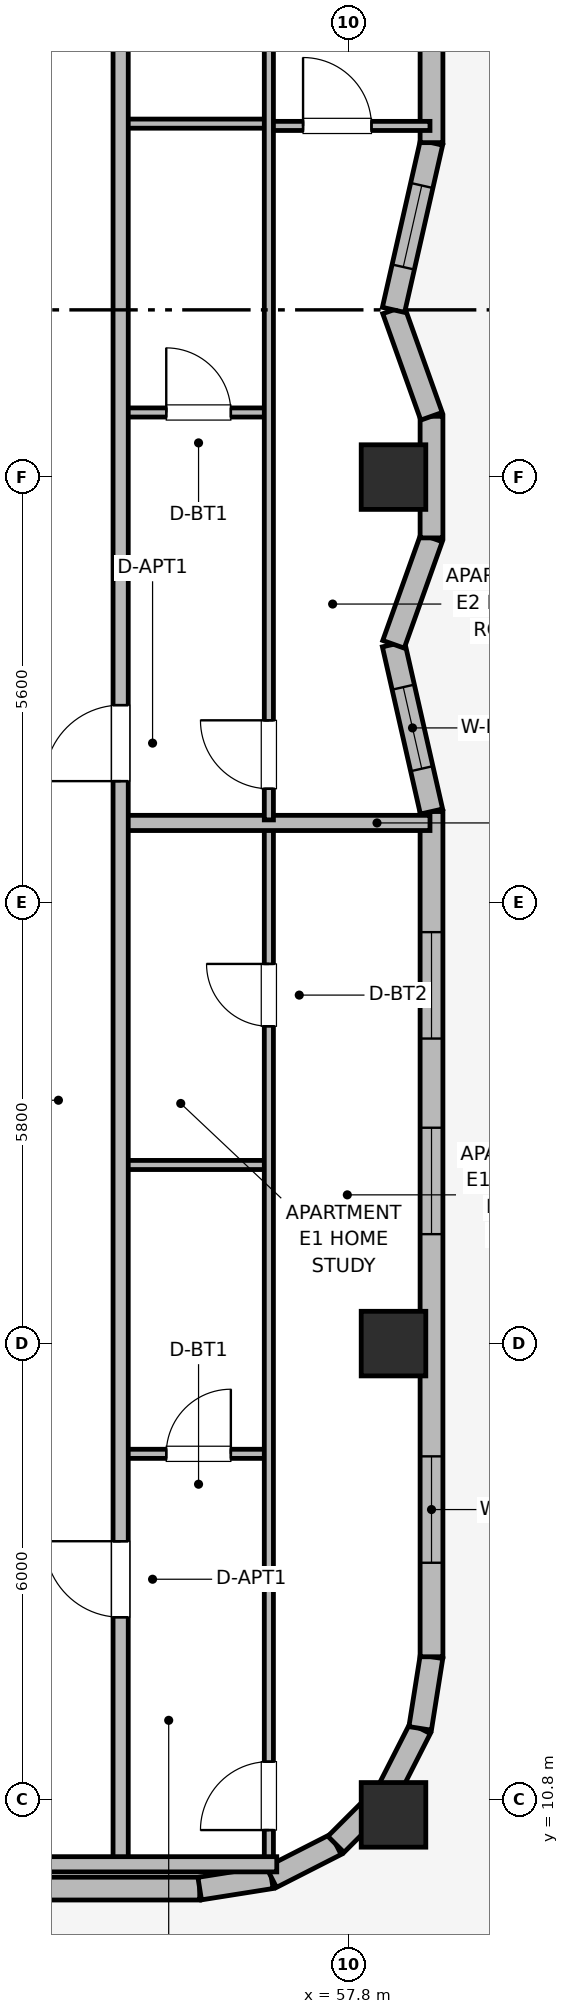
"""IFC4 building model, lengths in metres.
Left out: names, types, materials, properties, quantities, classifications, styles, units other than length and angle.
Written with IfcOpenShell. Run it as: python <this file> out.ifc"""

import sys

from ifc_helpers import new_model, si_unit, direction, frame, frame_2d, origin, origin_2d, place, context, subcontext, project, spatial, rectangle, extrude, element, fill, save


model = new_model("IFC4")
c1 = context("Model", 3, precision=1e-05, world=origin(), true_north=direction((0.0, 1.0)))
c2 = subcontext(c1, "Body", "Model", "MODEL_VIEW")
j1 = project(units=[si_unit("LENGTHUNIT", "METRE"), si_unit("PLANEANGLEUNIT", "RADIAN")], contexts=[c1])
p1 = place(None, origin())
s1 = spatial("IfcSite", under=j1, at=p1, CompositionType="ELEMENT")
p2 = place(p1, origin())
s2 = spatial("IfcBuilding", under=s1, at=p2, CompositionType="ELEMENT")
p3 = place(p2, frame((0.0, 0.0, 225.8)))
s3 = spatial("IfcBuildingStorey", under=s2, at=p3, CompositionType="ELEMENT", Elevation=225.8)
for number, where, z_axis, x_axis in (
    (1, (58.39, 10.6, 0.0), (0.0, 0.0, 1.0), (1.0, 0.0, 0.0)),
    (2, (58.39, 16.8, 0.0), (0.0, 0.0, 1.0), (1.0, 0.0, 0.0)),
    (3, (58.39, 28.2, 0.0), (0.0, 0.0, 1.0), (1.0, 0.0, 0.0)),
):
    element("IfcColumn", number, at=place(p3, frame(where, z_axis=z_axis, x_axis=x_axis)), inside=s3, PredefinedType="COLUMN", context=c2, shape_type="SweptSolid", body=[
        extrude(rectangle(XDim=0.85, YDim=0.85, at=origin_2d()), origin(), (0.0, 0.0, 1.0), 3.7),
    ])
p4 = place(p3, frame((22.56, 9.63, 0.0), z_axis=(0.0, 0.0, 1.0), x_axis=(1.0, 0.0, 0.0)))
e4 = element("IfcWall", 4, at=p4, inside=s3, PredefinedType="SOLIDWALL", context=c2, shape_type="SweptSolid", body=[
    extrude(rectangle(XDim=33.28, YDim=0.3, at=frame_2d((16.64, 0.0))), origin(), (0.0, 0.0, 1.0), 2.73),
])
p5 = place(p4, frame((4.647, 0.0, 0.71)))
e5 = element("IfcOpeningElement", 5, at=p5, cuts=e4, PredefinedType="OPENING", context=c2, shape_type="SweptSolid", body=[
    extrude(rectangle(XDim=1.6, YDim=1.9, at=frame_2d((0.8, 0.95))), frame((0.0, 0.16, 0.0), z_axis=(0.0, -1.0, 0.0), x_axis=(1.0, 0.0, 0.0)), (0.0, 0.0, 1.0), 0.32),
])
p6 = place(p4, frame((7.845, 0.0, 0.71)))
e6 = element("IfcOpeningElement", 6, at=p6, cuts=e4, PredefinedType="OPENING", context=c2, shape_type="SweptSolid", body=[
    extrude(rectangle(XDim=1.6, YDim=1.9, at=frame_2d((0.8, 0.95))), frame((0.0, 0.16, 0.0), z_axis=(0.0, -1.0, 0.0), x_axis=(1.0, 0.0, 0.0)), (0.0, 0.0, 1.0), 0.32),
])
p7 = place(p4, frame((14.241, 0.0, 0.71)))
e7 = element("IfcOpeningElement", 7, at=p7, cuts=e4, PredefinedType="OPENING", context=c2, shape_type="SweptSolid", body=[
    extrude(rectangle(XDim=1.6, YDim=1.9, at=frame_2d((0.8, 0.95))), frame((0.0, 0.16, 0.0), z_axis=(0.0, -1.0, 0.0), x_axis=(1.0, 0.0, 0.0)), (0.0, 0.0, 1.0), 0.32),
])
p8 = place(p4, frame((17.439, 0.0, 0.71)))
e8 = element("IfcOpeningElement", 8, at=p8, cuts=e4, PredefinedType="OPENING", context=c2, shape_type="SweptSolid", body=[
    extrude(rectangle(XDim=1.6, YDim=1.9, at=frame_2d((0.8, 0.95))), frame((0.0, 0.16, 0.0), z_axis=(0.0, -1.0, 0.0), x_axis=(1.0, 0.0, 0.0)), (0.0, 0.0, 1.0), 0.32),
])
p9 = place(p4, frame((23.835, 0.0, 0.71)))
e9 = element("IfcOpeningElement", 9, at=p9, cuts=e4, PredefinedType="OPENING", context=c2, shape_type="SweptSolid", body=[
    extrude(rectangle(XDim=1.6, YDim=1.9, at=frame_2d((0.8, 0.95))), frame((0.0, 0.16, 0.0), z_axis=(0.0, -1.0, 0.0), x_axis=(1.0, 0.0, 0.0)), (0.0, 0.0, 1.0), 0.32),
])
p10 = place(p4, frame((27.033, 0.0, 0.71)))
e10 = element("IfcOpeningElement", 10, at=p10, cuts=e4, PredefinedType="OPENING", context=c2, shape_type="SweptSolid", body=[
    extrude(rectangle(XDim=1.6, YDim=1.9, at=frame_2d((0.8, 0.95))), frame((0.0, 0.16, 0.0), z_axis=(0.0, -1.0, 0.0), x_axis=(1.0, 0.0, 0.0)), (0.0, 0.0, 1.0), 0.32),
])
p11 = place(p3, frame((55.84, 9.63, 0.0), z_axis=(0.0, 0.0, 1.0), x_axis=(0.987663181641, 0.156593229835, 0.0)))
e11 = element("IfcWall", 11, at=p11, inside=s3, PredefinedType="SOLIDWALL", context=c2, shape_type="SweptSolid", body=[
    extrude(rectangle(XDim=0.954, YDim=0.3, at=frame_2d((0.477, 0.0))), origin(), (0.0, 0.0, 1.0), 2.73),
])
for number, where, z_axis, x_axis in (
    (12, (56.782, 9.779, 0.0), (0.0, 0.0, 1.0), (0.891, 0.454, 0.0)),
    (13, (57.633, 10.212, 0.0), (0.0, 0.0, 1.0), (0.707, 0.707, 0.0)),
    (14, (58.308, 10.887, 0.0), (0.0, 0.0, 1.0), (0.454, 0.891, 0.0)),
):
    element("IfcWall", number, at=place(p3, frame(where, z_axis=z_axis, x_axis=x_axis)), inside=s3, PredefinedType="SOLIDWALL", context=c2, shape_type="SweptSolid", body=[
        extrude(rectangle(XDim=0.954, YDim=0.3, at=frame_2d((0.477, 0.0))), origin(), (0.0, 0.0, 1.0), 2.73),
    ])
p12 = place(p3, frame((58.741, 11.738, 0.0), z_axis=(0.0, 0.0, 1.0), x_axis=(0.156343617883, 0.987702725088, 0.0)))
e15 = element("IfcWall", 15, at=p12, inside=s3, PredefinedType="SOLIDWALL", context=c2, shape_type="SweptSolid", body=[
    extrude(rectangle(XDim=0.954, YDim=0.3, at=frame_2d((0.477, 0.0))), origin(), (0.0, 0.0, 1.0), 2.73),
])
p13 = place(p3, frame((58.89, 12.68, 0.0), z_axis=(0.0, 0.0, 1.0), x_axis=(0.0, 1.0, 0.0)))
e16 = element("IfcWall", 16, at=p13, inside=s3, PredefinedType="SOLIDWALL", context=c2, shape_type="SweptSolid", body=[
    extrude(rectangle(XDim=11.12, YDim=0.3, at=frame_2d((5.56, 0.0))), origin(), (0.0, 0.0, 1.0), 2.73),
])
p14 = place(p13, frame((1.237, 0.0, 0.76)))
e17 = element("IfcOpeningElement", 17, at=p14, cuts=e16, PredefinedType="OPENING", context=c2, shape_type="SweptSolid", body=[
    extrude(rectangle(XDim=1.4, YDim=1.85, at=frame_2d((0.7, 0.925))), frame((0.0, 0.16, 0.0), z_axis=(0.0, -1.0, 0.0), x_axis=(1.0, 0.0, 0.0)), (0.0, 0.0, 1.0), 0.32),
])
p15 = place(p13, frame((5.56, 0.0, 0.76)))
e18 = element("IfcOpeningElement", 18, at=p15, cuts=e16, PredefinedType="OPENING", context=c2, shape_type="SweptSolid", body=[
    extrude(rectangle(XDim=1.4, YDim=1.85, at=frame_2d((0.7, 0.925))), frame((0.0, 0.16, 0.0), z_axis=(0.0, -1.0, 0.0), x_axis=(1.0, 0.0, 0.0)), (0.0, 0.0, 1.0), 0.32),
])
p16 = place(p13, frame((8.133, 0.0, 0.76)))
e19 = element("IfcOpeningElement", 19, at=p16, cuts=e16, PredefinedType="OPENING", context=c2, shape_type="SweptSolid", body=[
    extrude(rectangle(XDim=1.4, YDim=1.85, at=frame_2d((0.7, 0.925))), frame((0.0, 0.16, 0.0), z_axis=(0.0, -1.0, 0.0), x_axis=(1.0, 0.0, 0.0)), (0.0, 0.0, 1.0), 0.32),
])
p17 = place(p3, frame((58.89, 23.8, 0.0), z_axis=(0.0, 0.0, 1.0), x_axis=(-0.221625780886, 0.975131792758, 0.0)))
e20 = element("IfcWall", 20, at=p17, inside=s3, PredefinedType="SOLIDWALL", context=c2, shape_type="SweptSolid", body=[
    extrude(rectangle(XDim=2.256, YDim=0.3, at=frame_2d((1.128, 0.0))), origin(), (0.0, 0.0, 1.0), 2.73),
])
p18 = place(p17, frame((0.578, 0.0, 0.92)))
e21 = element("IfcOpeningElement", 21, at=p18, cuts=e20, PredefinedType="OPENING", context=c2, shape_type="SweptSolid", body=[
    extrude(rectangle(XDim=1.1, YDim=1.65, at=frame_2d((0.55, 0.825))), frame((0.0, 0.16, 0.0), z_axis=(0.0, -1.0, 0.0), x_axis=(1.0, 0.0, 0.0)), (0.0, 0.0, 1.0), 0.32),
])
p19 = place(p3, frame((58.39, 26.0, 0.0), z_axis=(0.0, 0.0, 1.0), x_axis=(0.336357205213, 0.94173447983, 0.0)))
e22 = element("IfcWall", 22, at=p19, inside=s3, PredefinedType="SOLIDWALL", context=c2, shape_type="SweptSolid", body=[
    extrude(rectangle(XDim=1.487, YDim=0.3, at=frame_2d((0.743, 0.0))), origin(), (0.0, 0.0, 1.0), 2.73),
])
p20 = place(p3, frame((58.89, 27.4, 0.0), z_axis=(0.0, 0.0, 1.0), x_axis=(0.0, 1.0, 0.0)))
e23 = element("IfcWall", 23, at=p20, inside=s3, PredefinedType="SOLIDWALL", context=c2, shape_type="SweptSolid", body=[
    extrude(rectangle(XDim=1.6, YDim=0.3, at=frame_2d((0.8, 0.0))), origin(), (0.0, 0.0, 1.0), 2.73),
])
p21 = place(p3, frame((58.89, 29.0, 0.0), z_axis=(0.0, 0.0, 1.0), x_axis=(-0.336357205213, 0.94173447983, 0.0)))
e24 = element("IfcWall", 24, at=p21, inside=s3, PredefinedType="SOLIDWALL", context=c2, shape_type="SweptSolid", body=[
    extrude(rectangle(XDim=1.487, YDim=0.3, at=frame_2d((0.743, 0.0))), origin(), (0.0, 0.0, 1.0), 2.73),
])
p22 = place(p3, frame((58.39, 30.4, 0.0), z_axis=(0.0, 0.0, 1.0), x_axis=(0.221602396322, 0.975137107254, 0.0)))
e25 = element("IfcWall", 25, at=p22, inside=s3, PredefinedType="SOLIDWALL", context=c2, shape_type="SweptSolid", body=[
    extrude(rectangle(XDim=2.256, YDim=0.3, at=frame_2d((1.128, 0.0))), origin(), (0.0, 0.0, 1.0), 2.73),
])
p23 = place(p22, frame((0.578, 0.0, 0.92)))
e26 = element("IfcOpeningElement", 26, at=p23, cuts=e25, PredefinedType="OPENING", context=c2, shape_type="SweptSolid", body=[
    extrude(rectangle(XDim=1.1, YDim=1.65, at=frame_2d((0.55, 0.825))), frame((0.0, 0.16, 0.0), z_axis=(0.0, -1.0, 0.0), x_axis=(1.0, 0.0, 0.0)), (0.0, 0.0, 1.0), 0.32),
])
p24 = place(p3, frame((58.89, 32.6, 0.0), z_axis=(0.0, 0.0, 1.0), x_axis=(0.0, 1.0, 0.0)))
e27 = element("IfcWall", 27, at=p24, inside=s3, PredefinedType="SOLIDWALL", context=c2, shape_type="SweptSolid", body=[
    extrude(rectangle(XDim=11.12, YDim=0.3, at=frame_2d((5.56, 0.0))), origin(), (0.0, 0.0, 1.0), 2.73),
])
p25 = place(p24, frame((1.737, 0.0, 0.95)))
e28 = element("IfcOpeningElement", 28, at=p25, cuts=e27, PredefinedType="OPENING", context=c2, shape_type="SweptSolid", body=[
    extrude(rectangle(XDim=1.1, YDim=1.65, at=frame_2d((0.55, 0.825))), frame((0.0, 0.16, 0.0), z_axis=(0.0, -1.0, 0.0), x_axis=(1.0, 0.0, 0.0)), (0.0, 0.0, 1.0), 0.32),
])
p26 = place(p24, frame((4.66, 0.0, 0.95)))
e29 = element("IfcOpeningElement", 29, at=p26, cuts=e27, PredefinedType="OPENING", context=c2, shape_type="SweptSolid", body=[
    extrude(rectangle(XDim=1.1, YDim=1.65, at=frame_2d((0.55, 0.825))), frame((0.0, 0.16, 0.0), z_axis=(0.0, -1.0, 0.0), x_axis=(1.0, 0.0, 0.0)), (0.0, 0.0, 1.0), 0.32),
])
p27 = place(p24, frame((8.283, 0.0, 0.95)))
e30 = element("IfcOpeningElement", 30, at=p27, cuts=e27, PredefinedType="OPENING", context=c2, shape_type="SweptSolid", body=[
    extrude(rectangle(XDim=1.1, YDim=1.65, at=frame_2d((0.55, 0.825))), frame((0.0, 0.16, 0.0), z_axis=(0.0, -1.0, 0.0), x_axis=(1.0, 0.0, 0.0)), (0.0, 0.0, 1.0), 0.32),
])
p28 = place(p3, frame((54.8, 15.35, 0.0), z_axis=(0.0, 0.0, 1.0), x_axis=(1.0, 0.0, 0.0)))
e31 = element("IfcWall", 31, at=p28, inside=s3, PredefinedType="PARTITIONING", context=c2, shape_type="SweptSolid", body=[
    extrude(rectangle(XDim=1.95, YDim=0.12, at=frame_2d((0.975, 0.0))), origin(), (0.0, 0.0, 1.0), 2.56),
])
p29 = place(p28, frame((0.6, 0.0, 0.0)))
e32 = element("IfcOpeningElement", 32, at=p29, cuts=e31, PredefinedType="OPENING", context=c2, shape_type="SweptSolid", body=[
    extrude(rectangle(XDim=0.85, YDim=2.1, at=frame_2d((0.425, 1.05))), frame((0.0, 0.07, 0.0), z_axis=(0.0, -1.0, 0.0), x_axis=(1.0, 0.0, 0.0)), (0.0, 0.0, 1.0), 0.14),
])
p30 = place(p3, frame((54.8, 19.15, 0.0), z_axis=(0.0, 0.0, 1.0), x_axis=(1.0, 0.0, 0.0)))
e33 = element("IfcWall", 33, at=p30, inside=s3, PredefinedType="PARTITIONING", context=c2, shape_type="SweptSolid", body=[
    extrude(rectangle(XDim=1.95, YDim=0.12, at=frame_2d((0.975, 0.0))), origin(), (0.0, 0.0, 1.0), 2.56),
])
p31 = place(p3, frame((56.75, 9.99, 0.0), z_axis=(0.0, 0.0, 1.0), x_axis=(0.0, 1.0, 0.0)))
e34 = element("IfcWall", 34, at=p31, inside=s3, PredefinedType="PARTITIONING", context=c2, shape_type="SweptSolid", body=[
    extrude(rectangle(XDim=13.62, YDim=0.12, at=frame_2d((6.81, 0.0))), origin(), (0.0, 0.0, 1.0), 2.56),
])
p32 = place(p31, frame((0.41, 0.0, 0.0)))
e35 = element("IfcOpeningElement", 35, at=p32, cuts=e34, PredefinedType="OPENING", context=c2, shape_type="SweptSolid", body=[
    extrude(rectangle(XDim=0.9, YDim=2.1, at=frame_2d((0.45, 1.05))), frame((0.0, 0.07, 0.0), z_axis=(0.0, -1.0, 0.0), x_axis=(1.0, 0.0, 0.0)), (0.0, 0.0, 1.0), 0.14),
])
p33 = place(p31, frame((10.985, 0.0, 0.0)))
e36 = element("IfcOpeningElement", 36, at=p33, cuts=e34, PredefinedType="OPENING", context=c2, shape_type="SweptSolid", body=[
    extrude(rectangle(XDim=0.82, YDim=2.08, at=frame_2d((0.41, 1.04))), frame((0.0, 0.07, 0.0), z_axis=(0.0, -1.0, 0.0), x_axis=(1.0, 0.0, 0.0)), (0.0, 0.0, 1.0), 0.14),
])
p34 = place(p3, frame((54.8, 23.65, 0.0), z_axis=(0.0, 0.0, 1.0), x_axis=(1.0, 0.0, 0.0)))
e37 = element("IfcWall", 37, at=p34, inside=s3, PredefinedType="PARTITIONING", context=c2, shape_type="SweptSolid", body=[
    extrude(rectangle(XDim=4.07, YDim=0.2, at=frame_2d((2.035, 0.0))), origin(), (0.0, 0.0, 1.0), 2.56),
])
p35 = place(p3, frame((54.8, 29.05, 0.0), z_axis=(0.0, 0.0, 1.0), x_axis=(1.0, 0.0, 0.0)))
e38 = element("IfcWall", 38, at=p35, inside=s3, PredefinedType="PARTITIONING", context=c2, shape_type="SweptSolid", body=[
    extrude(rectangle(XDim=1.95, YDim=0.12, at=frame_2d((0.975, 0.0))), origin(), (0.0, 0.0, 1.0), 2.56),
])
p36 = place(p35, frame((0.6, 0.0, 0.0)))
e39 = element("IfcOpeningElement", 39, at=p36, cuts=e38, PredefinedType="OPENING", context=c2, shape_type="SweptSolid", body=[
    extrude(rectangle(XDim=0.85, YDim=2.1, at=frame_2d((0.425, 1.05))), frame((0.0, 0.07, 0.0), z_axis=(0.0, -1.0, 0.0), x_axis=(1.0, 0.0, 0.0)), (0.0, 0.0, 1.0), 0.14),
])
p37 = place(p3, frame((54.8, 32.85, 0.0), z_axis=(0.0, 0.0, 1.0), x_axis=(1.0, 0.0, 0.0)))
e40 = element("IfcWall", 40, at=p37, inside=s3, PredefinedType="PARTITIONING", context=c2, shape_type="SweptSolid", body=[
    extrude(rectangle(XDim=1.95, YDim=0.12, at=frame_2d((0.975, 0.0))), origin(), (0.0, 0.0, 1.0), 2.56),
])
p38 = place(p3, frame((56.75, 32.82, 0.0), z_axis=(0.0, 0.0, 1.0), x_axis=(1.0, 0.0, 0.0)))
e41 = element("IfcWall", 41, at=p38, inside=s3, PredefinedType="PARTITIONING", context=c2, shape_type="SweptSolid", body=[
    extrude(rectangle(XDim=2.12, YDim=0.12, at=frame_2d((1.06, 0.0))), origin(), (0.0, 0.0, 1.0), 2.56),
])
p39 = place(p38, frame((0.45, 0.0, 0.0)))
e42 = element("IfcOpeningElement", 42, at=p39, cuts=e41, PredefinedType="OPENING", context=c2, shape_type="SweptSolid", body=[
    extrude(rectangle(XDim=0.9, YDim=2.1, at=frame_2d((0.45, 1.05))), frame((0.0, 0.07, 0.0), z_axis=(0.0, -1.0, 0.0), x_axis=(1.0, 0.0, 0.0)), (0.0, 0.0, 1.0), 0.14),
])
p40 = place(p3, frame((56.75, 23.69, 0.0), z_axis=(0.0, 0.0, 1.0), x_axis=(0.0, 1.0, 0.0)))
e43 = element("IfcWall", 43, at=p40, inside=s3, PredefinedType="PARTITIONING", context=c2, shape_type="SweptSolid", body=[
    extrude(rectangle(XDim=22.72, YDim=0.12, at=frame_2d((11.36, 0.0))), origin(), (0.0, 0.0, 1.0), 2.56),
])
p41 = place(p40, frame((0.41, 0.0, 0.0)))
e44 = element("IfcOpeningElement", 44, at=p41, cuts=e43, PredefinedType="OPENING", context=c2, shape_type="SweptSolid", body=[
    extrude(rectangle(XDim=0.9, YDim=2.1, at=frame_2d((0.45, 1.05))), frame((0.0, 0.07, 0.0), z_axis=(0.0, -1.0, 0.0), x_axis=(1.0, 0.0, 0.0)), (0.0, 0.0, 1.0), 0.14),
])
p42 = place(p40, frame((13.185, 0.0, 0.0)))
e45 = element("IfcOpeningElement", 45, at=p42, cuts=e43, PredefinedType="OPENING", context=c2, shape_type="SweptSolid", body=[
    extrude(rectangle(XDim=0.82, YDim=2.08, at=frame_2d((0.41, 1.04))), frame((0.0, 0.07, 0.0), z_axis=(0.0, -1.0, 0.0), x_axis=(1.0, 0.0, 0.0)), (0.0, 0.0, 1.0), 0.14),
])
p43 = place(p3, frame((54.8, 9.95, 0.0), z_axis=(0.0, 0.0, 1.0), x_axis=(0.0, 1.0, 0.0)))
e46 = element("IfcWall", 46, at=p43, inside=s3, PredefinedType="PARTITIONING", context=c2, shape_type="SweptSolid", body=[
    extrude(rectangle(XDim=36.5, YDim=0.2, at=frame_2d((18.25, 0.0))), origin(), (0.0, 0.0, 1.0), 2.56),
])
p44 = place(p43, frame((3.25, 0.0, 0.0)))
e47 = element("IfcOpeningElement", 47, at=p44, cuts=e46, PredefinedType="OPENING", context=c2, shape_type="SweptSolid", body=[
    extrude(rectangle(XDim=1.0, YDim=2.15, at=frame_2d((0.5, 1.075))), frame((0.0, 0.11, 0.0), z_axis=(0.0, -1.0, 0.0), x_axis=(1.0, 0.0, 0.0)), (0.0, 0.0, 1.0), 0.22),
])
p45 = place(p43, frame((14.25, 0.0, 0.0)))
e48 = element("IfcOpeningElement", 48, at=p45, cuts=e46, PredefinedType="OPENING", context=c2, shape_type="SweptSolid", body=[
    extrude(rectangle(XDim=1.0, YDim=2.15, at=frame_2d((0.5, 1.075))), frame((0.0, 0.11, 0.0), z_axis=(0.0, -1.0, 0.0), x_axis=(1.0, 0.0, 0.0)), (0.0, 0.0, 1.0), 0.22),
])
p46 = place(p3, frame((53.1, 9.95, 0.0), z_axis=(0.0, 0.0, 1.0), x_axis=(1.0, 0.0, 0.0)))
e49 = element("IfcWall", 49, at=p46, inside=s3, PredefinedType="PARTITIONING", context=c2, shape_type="SweptSolid", body=[
    extrude(rectangle(XDim=3.754, YDim=0.2, at=frame_2d((1.877, 0.0))), origin(), (0.0, 0.0, 1.0), 2.56),
])
p47 = place(p14, origin())
e50 = element("IfcWindow", 50, at=p47, inside=s3, PartitioningType="SINGLE_PANEL", PredefinedType="WINDOW", context=c2, shape_type="SweptSolid", body=[
    extrude(rectangle(XDim=1.4, YDim=1.85, at=frame_2d((0.7, 0.925))), frame((0.0, 0.03, 0.0), z_axis=(0.0, -1.0, 0.0), x_axis=(1.0, 0.0, 0.0)), (0.0, 0.0, 1.0), 0.06),
])
fill(e17, e50)
p48 = place(p15, origin())
e51 = element("IfcWindow", 51, at=p48, inside=s3, PartitioningType="SINGLE_PANEL", PredefinedType="WINDOW", context=c2, shape_type="SweptSolid", body=[
    extrude(rectangle(XDim=1.4, YDim=1.85, at=frame_2d((0.7, 0.925))), frame((0.0, 0.03, 0.0), z_axis=(0.0, -1.0, 0.0), x_axis=(1.0, 0.0, 0.0)), (0.0, 0.0, 1.0), 0.06),
])
fill(e18, e51)
p49 = place(p16, origin())
e52 = element("IfcWindow", 52, at=p49, inside=s3, PartitioningType="SINGLE_PANEL", PredefinedType="WINDOW", context=c2, shape_type="SweptSolid", body=[
    extrude(rectangle(XDim=1.4, YDim=1.85, at=frame_2d((0.7, 0.925))), frame((0.0, 0.03, 0.0), z_axis=(0.0, -1.0, 0.0), x_axis=(1.0, 0.0, 0.0)), (0.0, 0.0, 1.0), 0.06),
])
fill(e19, e52)
p50 = place(p18, origin())
e53 = element("IfcWindow", 53, at=p50, inside=s3, PartitioningType="SINGLE_PANEL", PredefinedType="WINDOW", context=c2, shape_type="SweptSolid", body=[
    extrude(rectangle(XDim=1.1, YDim=1.65, at=frame_2d((0.55, 0.825))), frame((0.0, 0.03, 0.0), z_axis=(0.0, -1.0, 0.0), x_axis=(1.0, 0.0, 0.0)), (0.0, 0.0, 1.0), 0.06),
])
fill(e21, e53)
p51 = place(p23, origin())
e54 = element("IfcWindow", 54, at=p51, inside=s3, PartitioningType="SINGLE_PANEL", PredefinedType="WINDOW", context=c2, shape_type="SweptSolid", body=[
    extrude(rectangle(XDim=1.1, YDim=1.65, at=frame_2d((0.55, 0.825))), frame((0.0, 0.03, 0.0), z_axis=(0.0, -1.0, 0.0), x_axis=(1.0, 0.0, 0.0)), (0.0, 0.0, 1.0), 0.06),
])
fill(e26, e54)
p52 = place(p29, origin())
e55 = element("IfcDoor", 55, at=p52, inside=s3, OperationType="SINGLE_SWING_RIGHT", PredefinedType="DOOR", context=c2, shape_type="SweptSolid", body=[
    extrude(rectangle(XDim=0.85, YDim=2.1, at=frame_2d((0.425, 1.05))), frame((0.0, 0.025, 0.0), z_axis=(0.0, -1.0, 0.0), x_axis=(1.0, 0.0, 0.0)), (0.0, 0.0, 1.0), 0.05),
])
fill(e32, e55)
p53 = place(p32, origin())
e56 = element("IfcDoor", 56, at=p53, inside=s3, OperationType="SINGLE_SWING_LEFT", PredefinedType="DOOR", context=c2, shape_type="SweptSolid", body=[
    extrude(rectangle(XDim=0.9, YDim=2.1, at=frame_2d((0.45, 1.05))), frame((0.0, 0.025, 0.0), z_axis=(0.0, -1.0, 0.0), x_axis=(1.0, 0.0, 0.0)), (0.0, 0.0, 1.0), 0.05),
])
fill(e35, e56)
p54 = place(p33, origin())
e57 = element("IfcDoor", 57, at=p54, inside=s3, OperationType="SINGLE_SWING_RIGHT", PredefinedType="DOOR", context=c2, shape_type="SweptSolid", body=[
    extrude(rectangle(XDim=0.82, YDim=2.08, at=frame_2d((0.41, 1.04))), frame((0.0, 0.025, 0.0), z_axis=(0.0, -1.0, 0.0), x_axis=(1.0, 0.0, 0.0)), (0.0, 0.0, 1.0), 0.05),
])
fill(e36, e57)
p55 = place(p36, origin())
e58 = element("IfcDoor", 58, at=p55, inside=s3, OperationType="SINGLE_SWING_LEFT", PredefinedType="DOOR", context=c2, shape_type="SweptSolid", body=[
    extrude(rectangle(XDim=0.85, YDim=2.1, at=frame_2d((0.425, 1.05))), frame((0.0, 0.025, 0.0), z_axis=(0.0, -1.0, 0.0), x_axis=(1.0, 0.0, 0.0)), (0.0, 0.0, 1.0), 0.05),
])
fill(e39, e58)
p56 = place(p39, origin())
e59 = element("IfcDoor", 59, at=p56, inside=s3, OperationType="SINGLE_SWING_LEFT", PredefinedType="DOOR", context=c2, shape_type="SweptSolid", body=[
    extrude(rectangle(XDim=0.9, YDim=2.1, at=frame_2d((0.45, 1.05))), frame((0.0, 0.025, 0.0), z_axis=(0.0, -1.0, 0.0), x_axis=(1.0, 0.0, 0.0)), (0.0, 0.0, 1.0), 0.05),
])
fill(e42, e59)
p57 = place(p41, origin())
e60 = element("IfcDoor", 60, at=p57, inside=s3, OperationType="SINGLE_SWING_RIGHT", PredefinedType="DOOR", context=c2, shape_type="SweptSolid", body=[
    extrude(rectangle(XDim=0.9, YDim=2.1, at=frame_2d((0.45, 1.05))), frame((0.0, 0.025, 0.0), z_axis=(0.0, -1.0, 0.0), x_axis=(1.0, 0.0, 0.0)), (0.0, 0.0, 1.0), 0.05),
])
fill(e44, e60)
p58 = place(p44, origin())
e61 = element("IfcDoor", 61, at=p58, inside=s3, OperationType="SINGLE_SWING_RIGHT", PredefinedType="DOOR", context=c2, shape_type="SweptSolid", body=[
    extrude(rectangle(XDim=1.0, YDim=2.15, at=frame_2d((0.5, 1.075))), frame((0.0, 0.025, 0.0), z_axis=(0.0, -1.0, 0.0), x_axis=(1.0, 0.0, 0.0)), (0.0, 0.0, 1.0), 0.05),
])
fill(e47, e61)
p59 = place(p45, origin())
e62 = element("IfcDoor", 62, at=p59, inside=s3, OperationType="SINGLE_SWING_LEFT", PredefinedType="DOOR", context=c2, shape_type="SweptSolid", body=[
    extrude(rectangle(XDim=1.0, YDim=2.15, at=frame_2d((0.5, 1.075))), frame((0.0, 0.025, 0.0), z_axis=(0.0, -1.0, 0.0), x_axis=(1.0, 0.0, 0.0)), (0.0, 0.0, 1.0), 0.05),
])
fill(e48, e62)
save(model, sys.argv[1])
